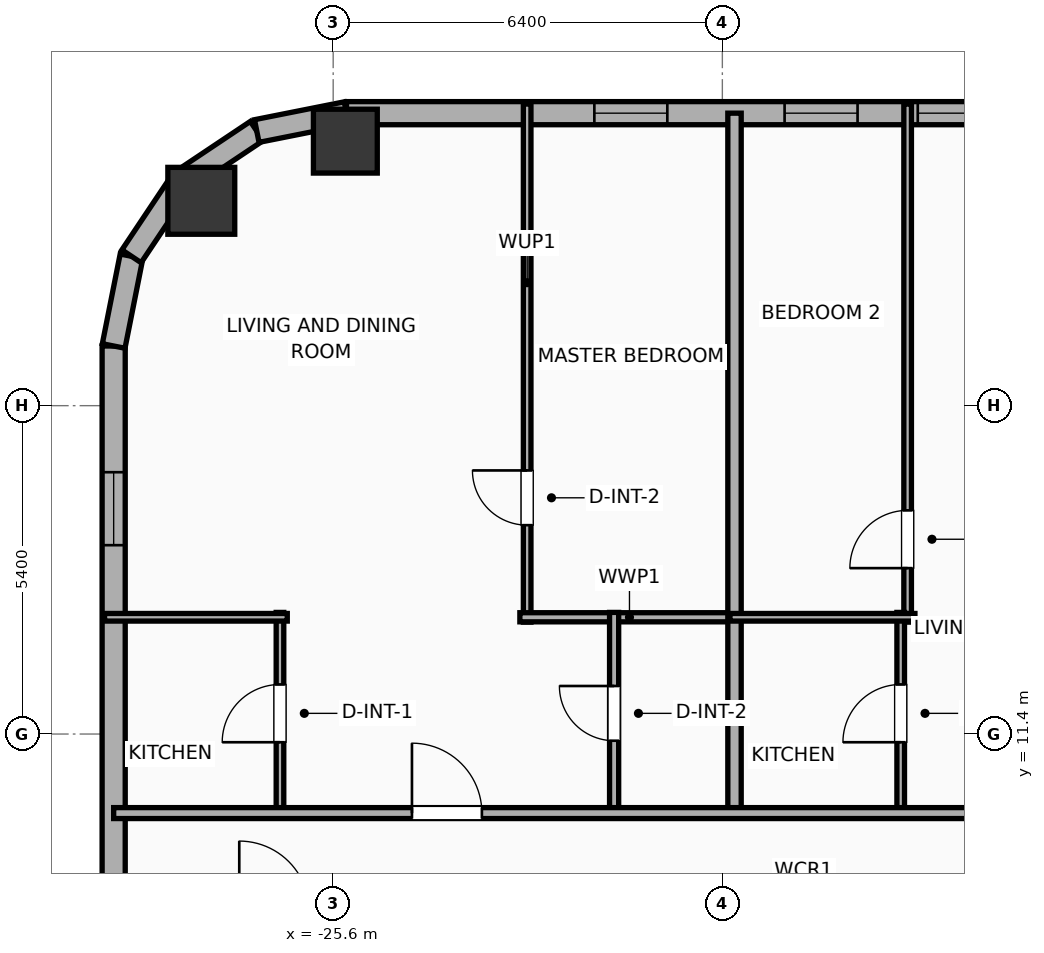
"""IFC4 building model, lengths in metres.
Left out: names, types, materials, properties, quantities, classifications, styles, units other than length and angle.
Written with IfcOpenShell. Run it as: python <this file> out.ifc"""

import sys

from ifc_helpers import new_model, si_unit, direction, frame, frame_2d, origin, origin_2d, place, context, subcontext, project, spatial, rectangle, hollow_rectangle, hollow_circle, extrude, element, fill, save


model = new_model("IFC4")
c1 = context("Model", 3, precision=1e-05, world=origin(), true_north=direction((0.0, 1.0)))
c2 = subcontext(c1, "Body", "Model", "MODEL_VIEW")
j1 = project(units=[si_unit("LENGTHUNIT", "METRE"), si_unit("PLANEANGLEUNIT", "RADIAN")], contexts=[c1])
p1 = place(None, origin())
s1 = spatial("IfcSite", under=j1, at=p1, CompositionType="ELEMENT")
p2 = place(p1, origin())
s2 = spatial("IfcBuilding", under=s1, at=p2, CompositionType="ELEMENT")
p3 = place(p2, frame((0.0, 0.0, 105.3)))
s3 = spatial("IfcBuildingStorey", under=s2, at=p3, CompositionType="ELEMENT", Elevation=105.3)
p4 = place(p3, frame((-25.4, 21.15, 0.0), z_axis=(0.0, 0.0, 1.0), x_axis=(1.0, 0.0, 0.0)))
e1 = element("IfcColumn", 1, at=p4, inside=s3, PredefinedType="COLUMN", context=c2, shape_type="SweptSolid", body=[
    extrude(hollow_rectangle(XDim=1.05, YDim=1.05, WallThickness=0.036, at=origin_2d()), origin(), (0.0, 0.0, 1.0), 3.9),
])
p5 = place(p3, frame((-27.769, 20.169, 0.0), z_axis=(0.0, 0.0, 1.0), x_axis=(1.0, 0.0, 0.0)))
e2 = element("IfcColumn", 2, at=p5, inside=s3, PredefinedType="COLUMN", context=c2, shape_type="SweptSolid", body=[
    extrude(hollow_circle(Radius=0.55, WallThickness=0.036, at=origin_2d()), origin(), (0.0, 0.0, 1.0), 3.9),
])
p6 = place(p3, frame((-29.21, -16.581, 0.0), z_axis=(0.0, 0.0, 1.0), x_axis=(0.0, 1.0, 0.0)))
e3 = element("IfcWall", 3, at=p6, inside=s3, PredefinedType="ELEMENTEDWALL", context=c2, shape_type="SweptSolid", body=[
    extrude(rectangle(XDim=34.363, YDim=0.38, at=frame_2d((17.181, 0.0))), origin(), (0.0, 0.0, 1.0), 3.65),
])
p7 = place(p6, frame((31.087, 0.0, 0.75)))
e4 = element("IfcOpeningElement", 4, at=p7, cuts=e3, PredefinedType="OPENING", context=c2, shape_type="SweptSolid", body=[
    extrude(rectangle(XDim=1.2, YDim=2.05, at=frame_2d((0.6, 1.025))), frame((0.0, 0.2, 0.0), z_axis=(0.0, -1.0, 0.0), x_axis=(1.0, 0.0, 0.0)), (0.0, 0.0, 1.0), 0.4),
])
p8 = place(p6, frame((21.626, 0.0, 0.75)))
e5 = element("IfcOpeningElement", 5, at=p8, cuts=e3, PredefinedType="OPENING", context=c2, shape_type="SweptSolid", body=[
    extrude(rectangle(XDim=1.2, YDim=2.05, at=frame_2d((0.6, 1.025))), frame((0.0, 0.2, 0.0), z_axis=(0.0, -1.0, 0.0), x_axis=(1.0, 0.0, 0.0)), (0.0, 0.0, 1.0), 0.4),
])
p9 = place(p6, frame((10.551, 0.0, 0.75)))
e6 = element("IfcOpeningElement", 6, at=p9, cuts=e3, PredefinedType="OPENING", context=c2, shape_type="SweptSolid", body=[
    extrude(rectangle(XDim=1.2, YDim=2.05, at=frame_2d((0.6, 1.025))), frame((0.0, 0.2, 0.0), z_axis=(0.0, -1.0, 0.0), x_axis=(1.0, 0.0, 0.0)), (0.0, 0.0, 1.0), 0.4),
])
p10 = place(p3, frame((-29.21, 17.781, 0.0), z_axis=(0.0, 0.0, 1.0), x_axis=(0.195086038585, 0.980786132421, 0.0)))
e7 = element("IfcWall", 7, at=p10, inside=s3, PredefinedType="ELEMENTEDWALL", context=c2, shape_type="SweptSolid", body=[
    extrude(rectangle(XDim=1.504, YDim=0.38, at=frame_2d((0.752, 0.0))), origin(), (0.0, 0.0, 1.0), 3.65),
])
p11 = place(p3, frame((-28.917, 19.257, 0.0), z_axis=(0.0, 0.0, 1.0), x_axis=(0.555610286119, 0.831442848281, 0.0)))
e8 = element("IfcWall", 8, at=p11, inside=s3, PredefinedType="ELEMENTEDWALL", context=c2, shape_type="SweptSolid", body=[
    extrude(rectangle(XDim=1.485, YDim=0.38, at=frame_2d((0.743, 0.0))), origin(), (0.0, 0.0, 1.0), 3.65),
])
p12 = place(p3, frame((-28.091, 20.491, 0.0), z_axis=(0.0, 0.0, 1.0), x_axis=(0.831468045563, 0.555572577804, 0.0)))
e9 = element("IfcWall", 9, at=p12, inside=s3, PredefinedType="ELEMENTEDWALL", context=c2, shape_type="SweptSolid", body=[
    extrude(rectangle(XDim=1.485, YDim=0.38, at=frame_2d((0.742, 0.0))), origin(), (0.0, 0.0, 1.0), 3.65),
])
p13 = place(p3, frame((-26.857, 21.316, 0.0), z_axis=(0.0, 0.0, 1.0), x_axis=(0.980755066645, 0.195242155415, 0.0)))
e10 = element("IfcWall", 10, at=p13, inside=s3, PredefinedType="ELEMENTEDWALL", context=c2, shape_type="SweptSolid", body=[
    extrude(rectangle(XDim=1.504, YDim=0.38, at=frame_2d((0.752, 0.0))), origin(), (0.0, 0.0, 1.0), 3.65),
])
p14 = place(p3, frame((-25.381, 21.61, 0.0), z_axis=(0.0, 0.0, 1.0), x_axis=(1.0, 0.0, 0.0)))
e11 = element("IfcWall", 11, at=p14, inside=s3, PredefinedType="ELEMENTEDWALL", context=c2, shape_type="SweptSolid", body=[
    extrude(rectangle(XDim=54.763, YDim=0.38, at=frame_2d((27.381, 0.0))), origin(), (0.0, 0.0, 1.0), 3.65),
])
p15 = place(p14, frame((45.067, 0.0, 0.75)))
e12 = element("IfcOpeningElement", 12, at=p15, cuts=e11, PredefinedType="OPENING", context=c2, shape_type="SweptSolid", body=[
    extrude(rectangle(XDim=2.4, YDim=2.1, at=frame_2d((1.2, 1.05))), frame((0.0, 0.2, 0.0), z_axis=(0.0, -1.0, 0.0), x_axis=(1.0, 0.0, 0.0)), (0.0, 0.0, 1.0), 0.4),
])
p16 = place(p14, frame((4.076, 0.0, 0.75)))
e13 = element("IfcOpeningElement", 13, at=p16, cuts=e11, PredefinedType="OPENING", context=c2, shape_type="SweptSolid", body=[
    extrude(rectangle(XDim=1.2, YDim=2.05, at=frame_2d((0.6, 1.025))), frame((0.0, 0.2, 0.0), z_axis=(0.0, -1.0, 0.0), x_axis=(1.0, 0.0, 0.0)), (0.0, 0.0, 1.0), 0.4),
])
p17 = place(p14, frame((9.395, 0.0, 0.75)))
e14 = element("IfcOpeningElement", 14, at=p17, cuts=e11, PredefinedType="OPENING", context=c2, shape_type="SweptSolid", body=[
    extrude(rectangle(XDim=0.85, YDim=2.05, at=frame_2d((0.425, 1.025))), frame((0.0, 0.2, 0.0), z_axis=(0.0, -1.0, 0.0), x_axis=(1.0, 0.0, 0.0)), (0.0, 0.0, 1.0), 0.4),
])
p18 = place(p14, frame((7.205, 0.0, 0.75)))
e15 = element("IfcOpeningElement", 15, at=p18, cuts=e11, PredefinedType="OPENING", context=c2, shape_type="SweptSolid", body=[
    extrude(rectangle(XDim=1.2, YDim=2.05, at=frame_2d((0.6, 1.025))), frame((0.0, 0.2, 0.0), z_axis=(0.0, -1.0, 0.0), x_axis=(1.0, 0.0, 0.0)), (0.0, 0.0, 1.0), 0.4),
])
p19 = place(p14, frame((13.676, 0.0, 0.75)))
e16 = element("IfcOpeningElement", 16, at=p19, cuts=e11, PredefinedType="OPENING", context=c2, shape_type="SweptSolid", body=[
    extrude(rectangle(XDim=1.2, YDim=2.05, at=frame_2d((0.6, 1.025))), frame((0.0, 0.2, 0.0), z_axis=(0.0, -1.0, 0.0), x_axis=(1.0, 0.0, 0.0)), (0.0, 0.0, 1.0), 0.4),
])
p20 = place(p14, frame((17.136, 0.0, 0.75)))
e17 = element("IfcOpeningElement", 17, at=p20, cuts=e11, PredefinedType="OPENING", context=c2, shape_type="SweptSolid", body=[
    extrude(rectangle(XDim=1.2, YDim=2.05, at=frame_2d((0.6, 1.025))), frame((0.0, 0.2, 0.0), z_axis=(0.0, -1.0, 0.0), x_axis=(1.0, 0.0, 0.0)), (0.0, 0.0, 1.0), 0.4),
])
p21 = place(p14, frame((22.656, 0.0, 0.75)))
e18 = element("IfcOpeningElement", 18, at=p21, cuts=e11, PredefinedType="OPENING", context=c2, shape_type="SweptSolid", body=[
    extrude(rectangle(XDim=1.2, YDim=2.05, at=frame_2d((0.6, 1.025))), frame((0.0, 0.2, 0.0), z_axis=(0.0, -1.0, 0.0), x_axis=(1.0, 0.0, 0.0)), (0.0, 0.0, 1.0), 0.4),
])
p22 = place(p14, frame((29.443, 0.0, 0.75)))
e19 = element("IfcOpeningElement", 19, at=p22, cuts=e11, PredefinedType="OPENING", context=c2, shape_type="SweptSolid", body=[
    extrude(rectangle(XDim=1.2, YDim=2.05, at=frame_2d((0.6, 1.025))), frame((0.0, 0.2, 0.0), z_axis=(0.0, -1.0, 0.0), x_axis=(1.0, 0.0, 0.0)), (0.0, 0.0, 1.0), 0.4),
])
p23 = place(p14, frame((26.348, 0.0, 0.75)))
e20 = element("IfcOpeningElement", 20, at=p23, cuts=e11, PredefinedType="OPENING", context=c2, shape_type="SweptSolid", body=[
    extrude(rectangle(XDim=1.2, YDim=2.05, at=frame_2d((0.6, 1.025))), frame((0.0, 0.2, 0.0), z_axis=(0.0, -1.0, 0.0), x_axis=(1.0, 0.0, 0.0)), (0.0, 0.0, 1.0), 0.4),
])
p24 = place(p14, frame((33.596, 0.0, 0.75)))
e21 = element("IfcOpeningElement", 21, at=p24, cuts=e11, PredefinedType="OPENING", context=c2, shape_type="SweptSolid", body=[
    extrude(rectangle(XDim=1.2, YDim=2.05, at=frame_2d((0.6, 1.025))), frame((0.0, 0.2, 0.0), z_axis=(0.0, -1.0, 0.0), x_axis=(1.0, 0.0, 0.0)), (0.0, 0.0, 1.0), 0.4),
])
p25 = place(p14, frame((36.014, 0.0, 0.75)))
e22 = element("IfcOpeningElement", 22, at=p25, cuts=e11, PredefinedType="OPENING", context=c2, shape_type="SweptSolid", body=[
    extrude(rectangle(XDim=1.2, YDim=2.05, at=frame_2d((0.6, 1.025))), frame((0.0, 0.2, 0.0), z_axis=(0.0, -1.0, 0.0), x_axis=(1.0, 0.0, 0.0)), (0.0, 0.0, 1.0), 0.4),
])
p26 = place(p14, frame((40.814, 0.0, 0.75)))
e23 = element("IfcOpeningElement", 23, at=p26, cuts=e11, PredefinedType="OPENING", context=c2, shape_type="SweptSolid", body=[
    extrude(rectangle(XDim=1.2, YDim=2.05, at=frame_2d((0.6, 1.025))), frame((0.0, 0.2, 0.0), z_axis=(0.0, -1.0, 0.0), x_axis=(1.0, 0.0, 0.0)), (0.0, 0.0, 1.0), 0.4),
])
p27 = place(p14, frame((49.385, 0.0, 0.75)))
e24 = element("IfcOpeningElement", 24, at=p27, cuts=e11, PredefinedType="OPENING", context=c2, shape_type="SweptSolid", body=[
    extrude(rectangle(XDim=1.2, YDim=2.05, at=frame_2d((0.6, 1.025))), frame((0.0, 0.2, 0.0), z_axis=(0.0, -1.0, 0.0), x_axis=(1.0, 0.0, 0.0)), (0.0, 0.0, 1.0), 0.4),
])
p28 = place(p14, frame((52.181, 0.0, 0.75)))
e25 = element("IfcOpeningElement", 25, at=p28, cuts=e11, PredefinedType="OPENING", context=c2, shape_type="SweptSolid", body=[
    extrude(rectangle(XDim=1.2, YDim=2.05, at=frame_2d((0.6, 1.025))), frame((0.0, 0.2, 0.0), z_axis=(0.0, -1.0, 0.0), x_axis=(1.0, 0.0, 0.0)), (0.0, 0.0, 1.0), 0.4),
])
p29 = place(p3, frame((-22.41, 13.24, 0.0), z_axis=(0.0, 0.0, 1.0), x_axis=(0.0, 1.0, 0.0)))
e26 = element("IfcWall", 26, at=p29, inside=s3, PredefinedType="PARTITIONING", context=c2, shape_type="SweptSolid", body=[
    extrude(rectangle(XDim=8.52, YDim=0.125, at=frame_2d((4.26, 0.0))), origin(), (0.0, 0.0, 1.0), 3.65),
])
p30 = place(p29, frame((1.595, 0.0, 0.0)))
e27 = element("IfcOpeningElement", 27, at=p30, cuts=e26, PredefinedType="OPENING", context=c2, shape_type="SweptSolid", body=[
    extrude(rectangle(XDim=0.9, YDim=2.05, at=frame_2d((0.45, 1.025))), frame((0.0, 0.073, 0.0), z_axis=(0.0, -1.0, 0.0), x_axis=(1.0, 0.0, 0.0)), (0.0, 0.0, 1.0), 0.145),
])
p31 = place(p3, frame((-22.53, 13.32, 0.0), z_axis=(0.0, 0.0, 1.0), x_axis=(1.0, 0.0, 0.0)))
e28 = element("IfcWall", 28, at=p31, inside=s3, PredefinedType="PLUMBINGWALL", context=c2, shape_type="SweptSolid", body=[
    extrude(rectangle(XDim=3.605, YDim=0.15, at=frame_2d((1.802, 0.0))), origin(), (0.0, 0.0, 1.0), 3.65),
])
p32 = place(p3, frame((-26.475, 10.08, 0.0), z_axis=(0.0, 0.0, 1.0), x_axis=(0.0, 1.0, 0.0)))
e29 = element("IfcWall", 29, at=p32, inside=s3, PredefinedType="PARTITIONING", context=c2, shape_type="SweptSolid", body=[
    extrude(rectangle(XDim=3.32, YDim=0.125, at=frame_2d((1.66, 0.0))), origin(), (0.0, 0.0, 1.0), 3.65),
])
p33 = place(p32, frame((1.185, 0.0, 0.0)))
e30 = element("IfcOpeningElement", 30, at=p33, cuts=e29, PredefinedType="OPENING", context=c2, shape_type="SweptSolid", body=[
    extrude(rectangle(XDim=0.95, YDim=2.05, at=frame_2d((0.475, 1.025))), frame((0.0, 0.073, 0.0), z_axis=(0.0, -1.0, 0.0), x_axis=(1.0, 0.0, 0.0)), (0.0, 0.0, 1.0), 0.145),
])
p34 = place(p3, frame((-29.36, 13.32, 0.0), z_axis=(0.0, 0.0, 1.0), x_axis=(1.0, 0.0, 0.0)))
e31 = element("IfcWall", 31, at=p34, inside=s3, PredefinedType="PARTITIONING", context=c2, shape_type="SweptSolid", body=[
    extrude(rectangle(XDim=3.005, YDim=0.125, at=frame_2d((1.502, 0.0))), origin(), (0.0, 0.0, 1.0), 3.65),
])
p35 = place(p3, frame((-20.98, 10.08, 0.0), z_axis=(0.0, 0.0, 1.0), x_axis=(0.0, 1.0, 0.0)))
e32 = element("IfcWall", 32, at=p35, inside=s3, PredefinedType="PLUMBINGWALL", context=c2, shape_type="SweptSolid", body=[
    extrude(rectangle(XDim=3.32, YDim=0.15, at=frame_2d((1.66, 0.0))), origin(), (0.0, 0.0, 1.0), 3.65),
])
p36 = place(p35, frame((1.21, 0.0, 0.0)))
e33 = element("IfcOpeningElement", 33, at=p36, cuts=e32, PredefinedType="OPENING", context=c2, shape_type="SweptSolid", body=[
    extrude(rectangle(XDim=0.9, YDim=2.05, at=frame_2d((0.45, 1.025))), frame((0.0, 0.085, 0.0), z_axis=(0.0, -1.0, 0.0), x_axis=(1.0, 0.0, 0.0)), (0.0, 0.0, 1.0), 0.17),
])
p37 = place(p3, frame((-19.0, 10.02, 0.0), z_axis=(0.0, 0.0, 1.0), x_axis=(0.0, 1.0, 0.0)))
e34 = element("IfcWall", 34, at=p37, inside=s3, PredefinedType="PARTITIONING", context=c2, shape_type="SweptSolid", body=[
    extrude(rectangle(XDim=11.59, YDim=0.22, at=frame_2d((5.795, 0.0))), origin(), (0.0, 0.0, 1.0), 3.65),
])
p38 = place(p3, frame((-16.153, 13.24, 0.0), z_axis=(0.0, 0.0, 1.0), x_axis=(0.0, 1.0, 0.0)))
e35 = element("IfcWall", 35, at=p38, inside=s3, PredefinedType="PARTITIONING", context=c2, shape_type="SweptSolid", body=[
    extrude(rectangle(XDim=8.52, YDim=0.125, at=frame_2d((4.26, 0.0))), origin(), (0.0, 0.0, 1.0), 3.65),
])
p39 = place(p38, frame((0.888, 0.0, 0.0)))
e36 = element("IfcOpeningElement", 36, at=p39, cuts=e35, PredefinedType="OPENING", context=c2, shape_type="SweptSolid", body=[
    extrude(rectangle(XDim=0.95, YDim=2.05, at=frame_2d((0.475, 1.025))), frame((0.0, 0.073, 0.0), z_axis=(0.0, -1.0, 0.0), x_axis=(1.0, 0.0, 0.0)), (0.0, 0.0, 1.0), 0.145),
])
p40 = place(p3, frame((-16.267, 10.08, 0.0), z_axis=(0.0, 0.0, 1.0), x_axis=(0.0, 1.0, 0.0)))
e37 = element("IfcWall", 37, at=p40, inside=s3, PredefinedType="PARTITIONING", context=c2, shape_type="SweptSolid", body=[
    extrude(rectangle(XDim=3.32, YDim=0.125, at=frame_2d((1.66, 0.0))), origin(), (0.0, 0.0, 1.0), 3.65),
])
p41 = place(p40, frame((1.185, 0.0, 0.0)))
e38 = element("IfcOpeningElement", 38, at=p41, cuts=e37, PredefinedType="OPENING", context=c2, shape_type="SweptSolid", body=[
    extrude(rectangle(XDim=0.95, YDim=2.05, at=frame_2d((0.475, 1.025))), frame((0.0, 0.073, 0.0), z_axis=(0.0, -1.0, 0.0), x_axis=(1.0, 0.0, 0.0)), (0.0, 0.0, 1.0), 0.145),
])
p42 = place(p3, frame((-19.075, 13.32, 0.0), z_axis=(0.0, 0.0, 1.0), x_axis=(1.0, 0.0, 0.0)))
e39 = element("IfcWall", 39, at=p42, inside=s3, PredefinedType="PARTITIONING", context=c2, shape_type="SweptSolid", body=[
    extrude(rectangle(XDim=3.042, YDim=0.125, at=frame_2d((1.521, 0.0))), origin(), (0.0, 0.0, 1.0), 3.65),
])
p43 = place(p3, frame((-29.21, 10.1, 0.0), z_axis=(0.0, 0.0, 1.0), x_axis=(1.0, 0.0, 0.0)))
e40 = element("IfcWall", 40, at=p43, inside=s3, PredefinedType="PARTITIONING", context=c2, shape_type="SweptSolid", body=[
    extrude(rectangle(XDim=62.42, YDim=0.18, at=frame_2d((31.21, 0.0))), origin(), (0.0, 0.0, 1.0), 3.65),
])
p44 = place(p43, frame((4.906, 0.0, 0.0)))
e41 = element("IfcOpeningElement", 41, at=p44, cuts=e40, PredefinedType="OPENING", context=c2, shape_type="SweptSolid", body=[
    extrude(rectangle(XDim=1.15, YDim=2.05, at=frame_2d((0.575, 1.025))), frame((0.0, 0.1, 0.0), z_axis=(0.0, -1.0, 0.0), x_axis=(1.0, 0.0, 0.0)), (0.0, 0.0, 1.0), 0.2),
])
p45 = place(p43, frame((14.812, 0.0, 0.0)))
e42 = element("IfcOpeningElement", 42, at=p45, cuts=e40, PredefinedType="OPENING", context=c2, shape_type="SweptSolid", body=[
    extrude(rectangle(XDim=1.15, YDim=2.05, at=frame_2d((0.575, 1.025))), frame((0.0, 0.1, 0.0), z_axis=(0.0, -1.0, 0.0), x_axis=(1.0, 0.0, 0.0)), (0.0, 0.0, 1.0), 0.2),
])
p46 = place(p43, frame((24.406, 0.0, 0.0)))
e43 = element("IfcOpeningElement", 43, at=p46, cuts=e40, PredefinedType="OPENING", context=c2, shape_type="SweptSolid", body=[
    extrude(rectangle(XDim=1.15, YDim=2.05, at=frame_2d((0.575, 1.025))), frame((0.0, 0.1, 0.0), z_axis=(0.0, -1.0, 0.0), x_axis=(1.0, 0.0, 0.0)), (0.0, 0.0, 1.0), 0.2),
])
p47 = place(p43, frame((33.981, 0.0, 0.0)))
e44 = element("IfcOpeningElement", 44, at=p47, cuts=e40, PredefinedType="OPENING", context=c2, shape_type="SweptSolid", body=[
    extrude(rectangle(XDim=1.15, YDim=2.05, at=frame_2d((0.575, 1.025))), frame((0.0, 0.1, 0.0), z_axis=(0.0, -1.0, 0.0), x_axis=(1.0, 0.0, 0.0)), (0.0, 0.0, 1.0), 0.2),
])
p48 = place(p43, frame((43.138, 0.0, 0.0)))
e45 = element("IfcOpeningElement", 45, at=p48, cuts=e40, PredefinedType="OPENING", context=c2, shape_type="SweptSolid", body=[
    extrude(rectangle(XDim=1.15, YDim=2.05, at=frame_2d((0.575, 1.025))), frame((0.0, 0.1, 0.0), z_axis=(0.0, -1.0, 0.0), x_axis=(1.0, 0.0, 0.0)), (0.0, 0.0, 1.0), 0.2),
])
p49 = place(p43, frame((51.777, 0.0, 0.0)))
e46 = element("IfcOpeningElement", 46, at=p49, cuts=e40, PredefinedType="OPENING", context=c2, shape_type="SweptSolid", body=[
    extrude(rectangle(XDim=0.9, YDim=2.05, at=frame_2d((0.45, 1.025))), frame((0.0, 0.1, 0.0), z_axis=(0.0, -1.0, 0.0), x_axis=(1.0, 0.0, 0.0)), (0.0, 0.0, 1.0), 0.2),
])
p50 = place(p43, frame((58.718, 0.0, 0.0)))
e47 = element("IfcOpeningElement", 47, at=p50, cuts=e40, PredefinedType="OPENING", context=c2, shape_type="SweptSolid", body=[
    extrude(rectangle(XDim=0.9, YDim=2.05, at=frame_2d((0.45, 1.025))), frame((0.0, 0.1, 0.0), z_axis=(0.0, -1.0, 0.0), x_axis=(1.0, 0.0, 0.0)), (0.0, 0.0, 1.0), 0.2),
])
p51 = place(p7, origin())
e48 = element("IfcWindow", 48, at=p51, inside=s3, PartitioningType="SINGLE_PANEL", PredefinedType="WINDOW", context=c2, shape_type="SweptSolid", body=[
    extrude(rectangle(XDim=1.2, YDim=2.05, at=frame_2d((0.6, 1.025))), frame((0.0, 0.03, 0.0), z_axis=(0.0, -1.0, 0.0), x_axis=(1.0, 0.0, 0.0)), (0.0, 0.0, 1.0), 0.06),
])
fill(e4, e48)
p52 = place(p16, origin())
e49 = element("IfcWindow", 49, at=p52, inside=s3, PartitioningType="SINGLE_PANEL", PredefinedType="WINDOW", context=c2, shape_type="SweptSolid", body=[
    extrude(rectangle(XDim=1.2, YDim=2.05, at=frame_2d((0.6, 1.025))), frame((0.0, 0.03, 0.0), z_axis=(0.0, -1.0, 0.0), x_axis=(1.0, 0.0, 0.0)), (0.0, 0.0, 1.0), 0.06),
])
fill(e13, e49)
p53 = place(p17, origin())
e50 = element("IfcWindow", 50, at=p53, inside=s3, PartitioningType="SINGLE_PANEL", PredefinedType="WINDOW", context=c2, shape_type="SweptSolid", body=[
    extrude(rectangle(XDim=0.85, YDim=2.05, at=frame_2d((0.425, 1.025))), frame((0.0, 0.03, 0.0), z_axis=(0.0, -1.0, 0.0), x_axis=(1.0, 0.0, 0.0)), (0.0, 0.0, 1.0), 0.06),
])
fill(e14, e50)
p54 = place(p18, origin())
e51 = element("IfcWindow", 51, at=p54, inside=s3, PartitioningType="SINGLE_PANEL", PredefinedType="WINDOW", context=c2, shape_type="SweptSolid", body=[
    extrude(rectangle(XDim=1.2, YDim=2.05, at=frame_2d((0.6, 1.025))), frame((0.0, 0.03, 0.0), z_axis=(0.0, -1.0, 0.0), x_axis=(1.0, 0.0, 0.0)), (0.0, 0.0, 1.0), 0.06),
])
fill(e15, e51)
p55 = place(p30, origin())
e52 = element("IfcDoor", 52, at=p55, inside=s3, OperationType="SINGLE_SWING_RIGHT", PredefinedType="DOOR", context=c2, shape_type="SweptSolid", body=[
    extrude(rectangle(XDim=0.9, YDim=2.05, at=frame_2d((0.45, 1.025))), frame((0.0, 0.025, 0.0), z_axis=(0.0, -1.0, 0.0), x_axis=(1.0, 0.0, 0.0)), (0.0, 0.0, 1.0), 0.05),
])
fill(e27, e52)
p56 = place(p33, origin())
e53 = element("IfcDoor", 53, at=p56, inside=s3, OperationType="SINGLE_SWING_LEFT", PredefinedType="DOOR", context=c2, shape_type="SweptSolid", body=[
    extrude(rectangle(XDim=0.95, YDim=2.05, at=frame_2d((0.475, 1.025))), frame((0.0, 0.025, 0.0), z_axis=(0.0, -1.0, 0.0), x_axis=(1.0, 0.0, 0.0)), (0.0, 0.0, 1.0), 0.05),
])
fill(e30, e53)
p57 = place(p36, origin())
e54 = element("IfcDoor", 54, at=p57, inside=s3, OperationType="SINGLE_SWING_RIGHT", PredefinedType="DOOR", context=c2, shape_type="SweptSolid", body=[
    extrude(rectangle(XDim=0.9, YDim=2.05, at=frame_2d((0.45, 1.025))), frame((0.0, 0.025, 0.0), z_axis=(0.0, -1.0, 0.0), x_axis=(1.0, 0.0, 0.0)), (0.0, 0.0, 1.0), 0.05),
])
fill(e33, e54)
p58 = place(p39, origin())
e55 = element("IfcDoor", 55, at=p58, inside=s3, OperationType="SINGLE_SWING_LEFT", PredefinedType="DOOR", context=c2, shape_type="SweptSolid", body=[
    extrude(rectangle(XDim=0.95, YDim=2.05, at=frame_2d((0.475, 1.025))), frame((0.0, 0.025, 0.0), z_axis=(0.0, -1.0, 0.0), x_axis=(1.0, 0.0, 0.0)), (0.0, 0.0, 1.0), 0.05),
])
fill(e36, e55)
p59 = place(p41, origin())
e56 = element("IfcDoor", 56, at=p59, inside=s3, OperationType="SINGLE_SWING_LEFT", PredefinedType="DOOR", context=c2, shape_type="SweptSolid", body=[
    extrude(rectangle(XDim=0.95, YDim=2.05, at=frame_2d((0.475, 1.025))), frame((0.0, 0.025, 0.0), z_axis=(0.0, -1.0, 0.0), x_axis=(1.0, 0.0, 0.0)), (0.0, 0.0, 1.0), 0.05),
])
fill(e38, e56)
p60 = place(p44, origin())
e57 = element("IfcDoor", 57, at=p60, inside=s3, OperationType="SINGLE_SWING_LEFT", PredefinedType="DOOR", context=c2, shape_type="SweptSolid", body=[
    extrude(rectangle(XDim=1.15, YDim=2.05, at=frame_2d((0.575, 1.025))), frame((0.0, 0.025, 0.0), z_axis=(0.0, -1.0, 0.0), x_axis=(1.0, 0.0, 0.0)), (0.0, 0.0, 1.0), 0.05),
])
fill(e41, e57)
save(model, sys.argv[1])
